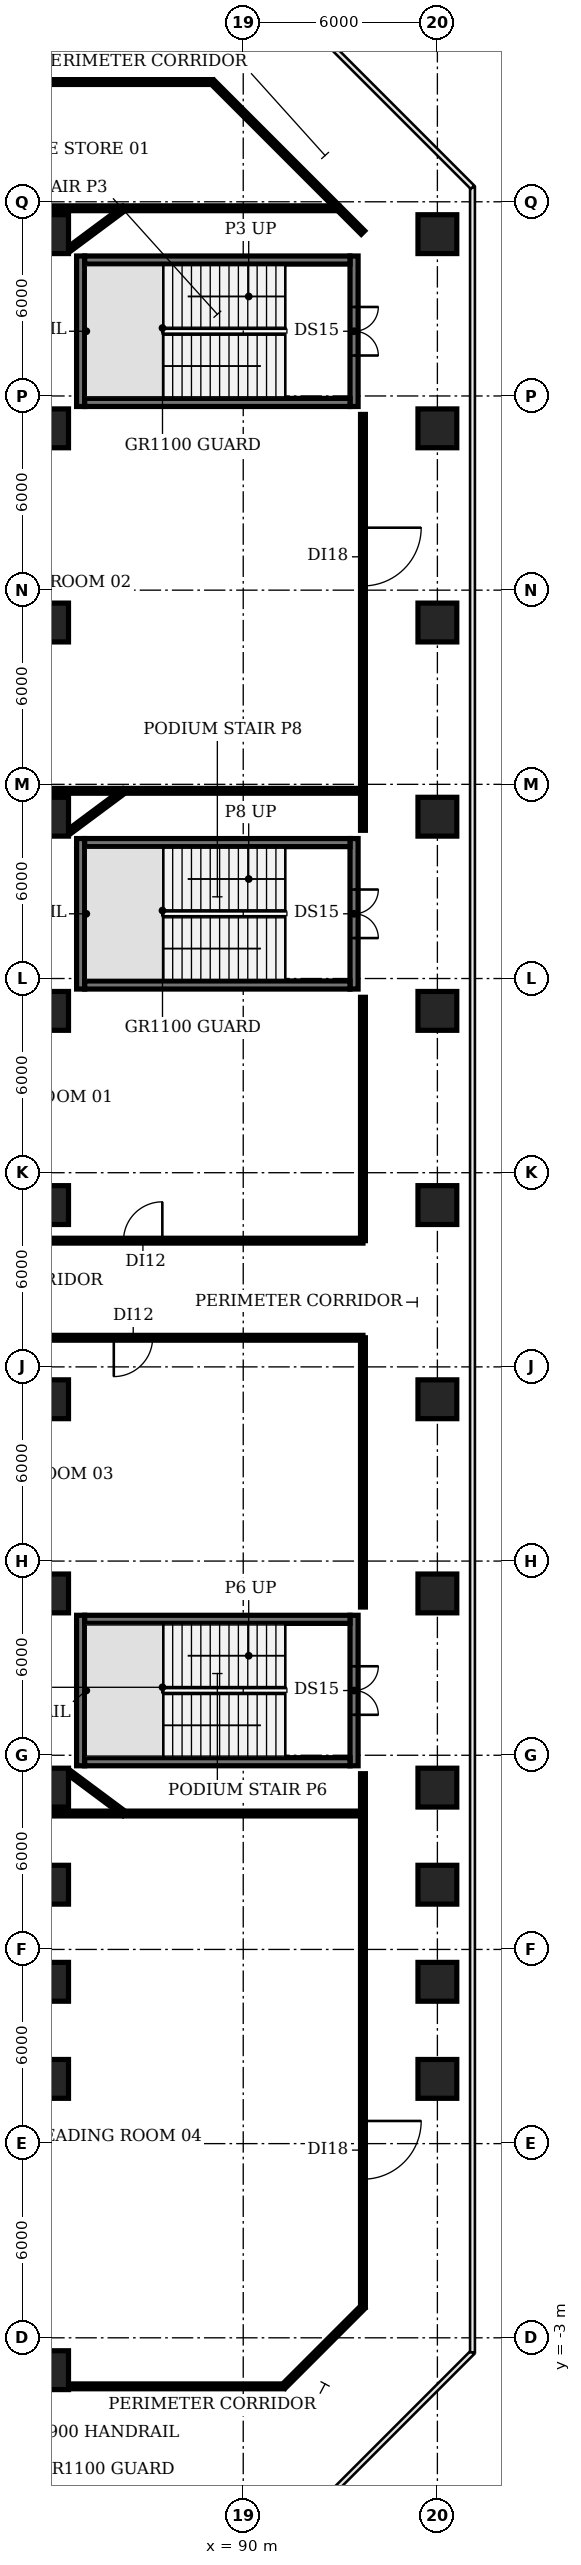
"""IFC4 building model, lengths in metres.
Left out: names, types, materials, properties, quantities, classifications, styles, units other than length and angle.
Written with IfcOpenShell. Run it as: python <this file> out.ifc"""

import sys

from ifc_helpers import new_model, si_unit, direction, frame, frame_2d, origin, origin_2d, place, context, subcontext, project, spatial, rectangle, extrude, element, fill, save


model = new_model("IFC4")
c1 = context("Model", 3, precision=1e-05, world=origin(), true_north=direction((0.0, 1.0)))
c2 = subcontext(c1, "Body", "Model", "MODEL_VIEW")
j1 = project(units=[si_unit("LENGTHUNIT", "METRE"), si_unit("PLANEANGLEUNIT", "RADIAN")], contexts=[c1])
p1 = place(None, origin())
s1 = spatial("IfcSite", under=j1, at=p1, CompositionType="ELEMENT")
p2 = place(p1, origin())
s2 = spatial("IfcBuilding", under=s1, at=p2, CompositionType="ELEMENT")
p3 = place(p2, frame((0.0, 0.0, 6.0)))
s3 = spatial("IfcBuildingStorey", under=s2, at=p3, CompositionType="ELEMENT", Elevation=6.0)
for number, where, z_axis, x_axis in (
    (1, (84.0, -4.0, 0.0), (0.0, 0.0, 1.0), (1.0, 0.0, 0.0)),
    (2, (84.0, 5.0, 0.0), (0.0, 0.0, 1.0), (1.0, 0.0, 0.0)),
    (3, (84.0, 8.0, 0.0), (0.0, 0.0, 1.0), (1.0, 0.0, 0.0)),
    (4, (84.0, 11.0, 0.0), (0.0, 0.0, 1.0), (1.0, 0.0, 0.0)),
    (5, (84.0, 14.0, 0.0), (0.0, 0.0, 1.0), (1.0, 0.0, 0.0)),
    (6, (84.0, 20.0, 0.0), (0.0, 0.0, 1.0), (1.0, 0.0, 0.0)),
    (7, (84.0, 26.0, 0.0), (0.0, 0.0, 1.0), (1.0, 0.0, 0.0)),
    (8, (84.0, 32.0, 0.0), (0.0, 0.0, 1.0), (1.0, 0.0, 0.0)),
    (9, (84.0, 38.0, 0.0), (0.0, 0.0, 1.0), (1.0, 0.0, 0.0)),
    (10, (84.0, 44.0, 0.0), (0.0, 0.0, 1.0), (1.0, 0.0, 0.0)),
    (11, (84.0, 50.0, 0.0), (0.0, 0.0, 1.0), (1.0, 0.0, 0.0)),
    (12, (84.0, 56.0, 0.0), (0.0, 0.0, 1.0), (1.0, 0.0, 0.0)),
    (13, (84.0, 62.0, 0.0), (0.0, 0.0, 1.0), (1.0, 0.0, 0.0)),
    (14, (96.0, 5.0, 0.0), (0.0, 0.0, 1.0), (1.0, 0.0, 0.0)),
    (15, (96.0, 8.0, 0.0), (0.0, 0.0, 1.0), (1.0, 0.0, 0.0)),
    (16, (96.0, 11.0, 0.0), (0.0, 0.0, 1.0), (1.0, 0.0, 0.0)),
    (17, (96.0, 14.0, 0.0), (0.0, 0.0, 1.0), (1.0, 0.0, 0.0)),
    (18, (96.0, 20.0, 0.0), (0.0, 0.0, 1.0), (1.0, 0.0, 0.0)),
    (19, (96.0, 26.0, 0.0), (0.0, 0.0, 1.0), (1.0, 0.0, 0.0)),
    (20, (96.0, 32.0, 0.0), (0.0, 0.0, 1.0), (1.0, 0.0, 0.0)),
    (21, (96.0, 38.0, 0.0), (0.0, 0.0, 1.0), (1.0, 0.0, 0.0)),
    (22, (96.0, 44.0, 0.0), (0.0, 0.0, 1.0), (1.0, 0.0, 0.0)),
    (23, (96.0, 50.0, 0.0), (0.0, 0.0, 1.0), (1.0, 0.0, 0.0)),
    (24, (96.0, 56.0, 0.0), (0.0, 0.0, 1.0), (1.0, 0.0, 0.0)),
    (25, (96.0, 62.0, 0.0), (0.0, 0.0, 1.0), (1.0, 0.0, 0.0)),
):
    element("IfcColumn", number, at=place(p3, frame(where, z_axis=z_axis, x_axis=x_axis)), inside=s3, PredefinedType="COLUMN", context=c2, shape_type="SweptSolid", body=[
        extrude(rectangle(XDim=1.2, YDim=1.2, at=origin_2d()), origin(), (0.0, 0.0, 1.0), 4.6),
    ])
p4 = place(p3, frame((84.975, 56.675, 0.0), z_axis=(0.0, 0.0, 1.0), x_axis=(0.0, 1.0, 0.0)))
e26 = element("IfcWall", 26, at=p4, inside=s3, PredefinedType="SHEAR", context=c2, shape_type="SweptSolid", body=[
    extrude(rectangle(XDim=4.65, YDim=0.25, at=frame_2d((2.325, 0.0))), origin(), (0.0, 0.0, 1.0), 4.6),
])
p5 = place(p3, frame((93.425, 61.325, 0.0), z_axis=(0.0, 0.0, 1.0), x_axis=(0.0, -1.0, 0.0)))
e27 = element("IfcWall", 27, at=p5, inside=s3, PredefinedType="SHEAR", context=c2, shape_type="SweptSolid", body=[
    extrude(rectangle(XDim=4.65, YDim=0.25, at=frame_2d((2.325, 0.0))), origin(), (0.0, 0.0, 1.0), 4.6),
])
p6 = place(p5, frame((1.575, 0.0, 0.0)))
e28 = element("IfcOpeningElement", 28, at=p6, cuts=e27, PredefinedType="OPENING", context=c2, shape_type="SweptSolid", body=[
    extrude(rectangle(XDim=1.5, YDim=2.1, at=frame_2d((0.75, 1.05))), frame((0.0, 0.135, 0.0), z_axis=(0.0, -1.0, 0.0), x_axis=(1.0, 0.0, 0.0)), (0.0, 0.0, 1.0), 0.27),
])
for number, where, z_axis, x_axis in (
    (29, (85.1, 56.8, 0.0), (0.0, 0.0, 1.0), (1.0, 0.0, 0.0)),
    (30, (85.1, 61.2, 0.0), (0.0, 0.0, 1.0), (1.0, 0.0, 0.0)),
):
    element("IfcWall", number, at=place(p3, frame(where, z_axis=z_axis, x_axis=x_axis)), inside=s3, PredefinedType="SHEAR", context=c2, shape_type="SweptSolid", body=[
        extrude(rectangle(XDim=8.2, YDim=0.25, at=frame_2d((4.1, 0.0))), origin(), (0.0, 0.0, 1.0), 4.6),
    ])
p7 = place(p3, frame((84.975, 14.675, 0.0), z_axis=(0.0, 0.0, 1.0), x_axis=(0.0, 1.0, 0.0)))
e31 = element("IfcWall", 31, at=p7, inside=s3, PredefinedType="SHEAR", context=c2, shape_type="SweptSolid", body=[
    extrude(rectangle(XDim=4.65, YDim=0.25, at=frame_2d((2.325, 0.0))), origin(), (0.0, 0.0, 1.0), 4.6),
])
p8 = place(p3, frame((93.425, 19.325, 0.0), z_axis=(0.0, 0.0, 1.0), x_axis=(0.0, -1.0, 0.0)))
e32 = element("IfcWall", 32, at=p8, inside=s3, PredefinedType="SHEAR", context=c2, shape_type="SweptSolid", body=[
    extrude(rectangle(XDim=4.65, YDim=0.25, at=frame_2d((2.325, 0.0))), origin(), (0.0, 0.0, 1.0), 4.6),
])
p9 = place(p8, frame((1.575, 0.0, 0.0)))
e33 = element("IfcOpeningElement", 33, at=p9, cuts=e32, PredefinedType="OPENING", context=c2, shape_type="SweptSolid", body=[
    extrude(rectangle(XDim=1.5, YDim=2.1, at=frame_2d((0.75, 1.05))), frame((0.0, 0.135, 0.0), z_axis=(0.0, -1.0, 0.0), x_axis=(1.0, 0.0, 0.0)), (0.0, 0.0, 1.0), 0.27),
])
for number, where, z_axis, x_axis in (
    (34, (85.1, 14.8, 0.0), (0.0, 0.0, 1.0), (1.0, 0.0, 0.0)),
    (35, (85.1, 19.2, 0.0), (0.0, 0.0, 1.0), (1.0, 0.0, 0.0)),
):
    element("IfcWall", number, at=place(p3, frame(where, z_axis=z_axis, x_axis=x_axis)), inside=s3, PredefinedType="SHEAR", context=c2, shape_type="SweptSolid", body=[
        extrude(rectangle(XDim=8.2, YDim=0.25, at=frame_2d((4.1, 0.0))), origin(), (0.0, 0.0, 1.0), 4.6),
    ])
p10 = place(p3, frame((84.975, 38.675, 0.0), z_axis=(0.0, 0.0, 1.0), x_axis=(0.0, 1.0, 0.0)))
e36 = element("IfcWall", 36, at=p10, inside=s3, PredefinedType="SHEAR", context=c2, shape_type="SweptSolid", body=[
    extrude(rectangle(XDim=4.65, YDim=0.25, at=frame_2d((2.325, 0.0))), origin(), (0.0, 0.0, 1.0), 4.6),
])
p11 = place(p3, frame((93.425, 43.325, 0.0), z_axis=(0.0, 0.0, 1.0), x_axis=(0.0, -1.0, 0.0)))
e37 = element("IfcWall", 37, at=p11, inside=s3, PredefinedType="SHEAR", context=c2, shape_type="SweptSolid", body=[
    extrude(rectangle(XDim=4.65, YDim=0.25, at=frame_2d((2.325, 0.0))), origin(), (0.0, 0.0, 1.0), 4.6),
])
p12 = place(p11, frame((1.575, 0.0, 0.0)))
e38 = element("IfcOpeningElement", 38, at=p12, cuts=e37, PredefinedType="OPENING", context=c2, shape_type="SweptSolid", body=[
    extrude(rectangle(XDim=1.5, YDim=2.1, at=frame_2d((0.75, 1.05))), frame((0.0, 0.135, 0.0), z_axis=(0.0, -1.0, 0.0), x_axis=(1.0, 0.0, 0.0)), (0.0, 0.0, 1.0), 0.27),
])
for number, where, z_axis, x_axis in (
    (39, (85.1, 38.8, 0.0), (0.0, 0.0, 1.0), (1.0, 0.0, 0.0)),
    (40, (85.1, 43.2, 0.0), (0.0, 0.0, 1.0), (1.0, 0.0, 0.0)),
):
    element("IfcWall", number, at=place(p3, frame(where, z_axis=z_axis, x_axis=x_axis)), inside=s3, PredefinedType="SHEAR", context=c2, shape_type="SweptSolid", body=[
        extrude(rectangle(XDim=8.2, YDim=0.25, at=frame_2d((4.1, 0.0))), origin(), (0.0, 0.0, 1.0), 4.6),
    ])
p13 = place(p3, frame((78.0, 13.2, 0.0), z_axis=(0.0, 0.0, 1.0), x_axis=(1.0, 0.0, 0.0)))
e41 = element("IfcWall", 41, at=p13, inside=s3, PredefinedType="PARTITIONING", context=c2, shape_type="SweptSolid", body=[
    extrude(rectangle(XDim=15.7, YDim=0.15, at=frame_2d((7.85, 0.0))), origin(), (0.0, 0.0, 1.0), 3.18),
])
p14 = place(p3, frame((78.0, 30.9, 0.0), z_axis=(0.0, 0.0, 1.0), x_axis=(1.0, 0.0, 0.0)))
e42 = element("IfcWall", 42, at=p14, inside=s3, PredefinedType="PARTITIONING", context=c2, shape_type="SweptSolid", body=[
    extrude(rectangle(XDim=15.7, YDim=0.15, at=frame_2d((7.85, 0.0))), origin(), (0.0, 0.0, 1.0), 3.18),
])
p15 = place(p14, frame((8.3, 0.0, 0.0)))
e43 = element("IfcOpeningElement", 43, at=p15, cuts=e42, PredefinedType="OPENING", context=c2, shape_type="SweptSolid", body=[
    extrude(rectangle(XDim=1.2, YDim=2.1, at=frame_2d((0.6, 1.05))), frame((0.0, 0.085, 0.0), z_axis=(0.0, -1.0, 0.0), x_axis=(1.0, 0.0, 0.0)), (0.0, 0.0, 1.0), 0.17),
])
p16 = place(p3, frame((78.0, 44.8, 0.0), z_axis=(0.0, 0.0, 1.0), x_axis=(1.0, 0.0, 0.0)))
e44 = element("IfcWall", 44, at=p16, inside=s3, PredefinedType="PARTITIONING", context=c2, shape_type="SweptSolid", body=[
    extrude(rectangle(XDim=15.7, YDim=0.15, at=frame_2d((7.85, 0.0))), origin(), (0.0, 0.0, 1.0), 3.18),
])
p17 = place(p3, frame((78.0, 62.8, 0.0), z_axis=(0.0, 0.0, 1.0), x_axis=(1.0, 0.0, 0.0)))
e45 = element("IfcWall", 45, at=p17, inside=s3, PredefinedType="PARTITIONING", context=c2, shape_type="SweptSolid", body=[
    extrude(rectangle(XDim=14.95, YDim=0.15, at=frame_2d((7.475, 0.0))), origin(), (0.0, 0.0, 1.0), 3.18),
])
p18 = place(p3, frame((84.46, -4.5, 0.0), z_axis=(0.0, 0.0, 1.0), x_axis=(1.0, 0.0, 0.0)))
e46 = element("IfcWall", 46, at=p18, inside=s3, PredefinedType="PARTITIONING", context=c2, shape_type="SweptSolid", body=[
    extrude(rectangle(XDim=6.79, YDim=0.15, at=frame_2d((3.395, 0.0))), origin(), (0.0, 0.0, 1.0), 3.18),
])
for number, where, z_axis, x_axis in (
    (47, (84.64, 14.45, 0.0), (0.0, 0.0, 1.0), (0.802, -0.597, 0.0)),
    (48, (84.64, 43.55, 0.0), (0.0, 0.0, 1.0), (0.802, 0.597, 0.0)),
    (49, (84.64, 61.55, 0.0), (0.0, 0.0, 1.0), (0.802, 0.597, 0.0)),
):
    element("IfcWall", number, at=place(p3, frame(where, z_axis=z_axis, x_axis=x_axis)), inside=s3, PredefinedType="PARTITIONING", context=c2, shape_type="SweptSolid", body=[
        extrude(rectangle(XDim=2.094, YDim=0.15, at=frame_2d((1.047, 0.0))), origin(), (0.0, 0.0, 1.0), 3.18),
    ])
p19 = place(p3, frame((89.05, 66.7, 0.0), z_axis=(0.0, 0.0, 1.0), x_axis=(-1.0, 0.0, 0.0)))
e50 = element("IfcWall", 50, at=p19, inside=s3, PredefinedType="PARTITIONING", context=c2, shape_type="SweptSolid", body=[
    extrude(rectangle(XDim=11.05, YDim=0.15, at=frame_2d((5.525, 0.0))), origin(), (0.0, 0.0, 1.0), 3.18),
])
p20 = place(p19, frame((6.65, 0.0, 0.0)))
e51 = element("IfcOpeningElement", 51, at=p20, cuts=e50, PredefinedType="OPENING", context=c2, shape_type="SweptSolid", body=[
    extrude(rectangle(XDim=0.9, YDim=2.1, at=frame_2d((0.45, 1.05))), frame((0.0, 0.085, 0.0), z_axis=(0.0, -1.0, 0.0), x_axis=(1.0, 0.0, 0.0)), (0.0, 0.0, 1.0), 0.17),
])
p21 = place(p3, frame((89.05, 66.7, 0.0), z_axis=(0.0, 0.0, 1.0), x_axis=(0.707106781187, -0.707106781187, 0.0)))
e52 = element("IfcWall", 52, at=p21, inside=s3, PredefinedType="PARTITIONING", context=c2, shape_type="SweptSolid", body=[
    extrude(rectangle(XDim=6.576, YDim=0.15, at=frame_2d((3.288, 0.0))), origin(), (0.0, 0.0, 1.0), 3.18),
])
p22 = place(p3, frame((91.25, -4.5, 0.0), z_axis=(0.0, 0.0, 1.0), x_axis=(0.707106781187, 0.707106781187, 0.0)))
e53 = element("IfcWall", 53, at=p22, inside=s3, PredefinedType="PARTITIONING", context=c2, shape_type="SweptSolid", body=[
    extrude(rectangle(XDim=3.465, YDim=0.15, at=frame_2d((1.732, 0.0))), origin(), (0.0, 0.0, 1.0), 3.18),
])
p23 = place(p3, frame((93.7, 13.2, 0.0), z_axis=(0.0, 0.0, 1.0), x_axis=(0.0, -1.0, 0.0)))
e54 = element("IfcWall", 54, at=p23, inside=s3, PredefinedType="PARTITIONING", context=c2, shape_type="SweptSolid", body=[
    extrude(rectangle(XDim=15.25, YDim=0.15, at=frame_2d((7.625, 0.0))), origin(), (0.0, 0.0, 1.0), 3.18),
])
p24 = place(p23, frame((9.5, 0.0, 0.0)))
e55 = element("IfcOpeningElement", 55, at=p24, cuts=e54, PredefinedType="OPENING", context=c2, shape_type="SweptSolid", body=[
    extrude(rectangle(XDim=1.8, YDim=2.1, at=frame_2d((0.9, 1.05))), frame((0.0, 0.085, 0.0), z_axis=(0.0, -1.0, 0.0), x_axis=(1.0, 0.0, 0.0)), (0.0, 0.0, 1.0), 0.17),
])
p25 = place(p3, frame((93.7, 13.2, 0.0), z_axis=(0.0, 0.0, 1.0), x_axis=(0.0, 1.0, 0.0)))
e56 = element("IfcWall", 56, at=p25, inside=s3, PredefinedType="PARTITIONING", context=c2, shape_type="SweptSolid", body=[
    extrude(rectangle(XDim=1.23, YDim=0.15, at=frame_2d((0.615, 0.0))), origin(), (0.0, 0.0, 1.0), 3.18),
])
p26 = place(p3, frame((93.7, 19.58, 0.0), z_axis=(0.0, 0.0, 1.0), x_axis=(0.0, 1.0, 0.0)))
e57 = element("IfcWall", 57, at=p26, inside=s3, PredefinedType="PARTITIONING", context=c2, shape_type="SweptSolid", body=[
    extrude(rectangle(XDim=8.32, YDim=0.15, at=frame_2d((4.16, 0.0))), origin(), (0.0, 0.0, 1.0), 3.18),
])
p27 = place(p3, frame((93.7, 27.9, 0.0), z_axis=(0.0, 0.0, 1.0), x_axis=(-1.0, 0.0, 0.0)))
e58 = element("IfcWall", 58, at=p27, inside=s3, PredefinedType="PARTITIONING", context=c2, shape_type="SweptSolid", body=[
    extrude(rectangle(XDim=15.7, YDim=0.15, at=frame_2d((7.85, 0.0))), origin(), (0.0, 0.0, 1.0), 3.18),
])
p28 = place(p27, frame((6.5, 0.0, 0.0)))
e59 = element("IfcOpeningElement", 59, at=p28, cuts=e58, PredefinedType="OPENING", context=c2, shape_type="SweptSolid", body=[
    extrude(rectangle(XDim=1.2, YDim=2.1, at=frame_2d((0.6, 1.05))), frame((0.0, 0.085, 0.0), z_axis=(0.0, -1.0, 0.0), x_axis=(1.0, 0.0, 0.0)), (0.0, 0.0, 1.0), 0.17),
])
p29 = place(p3, frame((93.7, 30.9, 0.0), z_axis=(0.0, 0.0, 1.0), x_axis=(0.0, 1.0, 0.0)))
e60 = element("IfcWall", 60, at=p29, inside=s3, PredefinedType="PARTITIONING", context=c2, shape_type="SweptSolid", body=[
    extrude(rectangle(XDim=7.52, YDim=0.15, at=frame_2d((3.76, 0.0))), origin(), (0.0, 0.0, 1.0), 3.18),
])
p30 = place(p3, frame((93.7, 43.58, 0.0), z_axis=(0.0, 0.0, 1.0), x_axis=(0.0, 1.0, 0.0)))
e61 = element("IfcWall", 61, at=p30, inside=s3, PredefinedType="PARTITIONING", context=c2, shape_type="SweptSolid", body=[
    extrude(rectangle(XDim=1.22, YDim=0.15, at=frame_2d((0.61, 0.0))), origin(), (0.0, 0.0, 1.0), 3.18),
])
p31 = place(p3, frame((93.7, 56.43, 0.0), z_axis=(0.0, 0.0, 1.0), x_axis=(0.0, -1.0, 0.0)))
e62 = element("IfcWall", 62, at=p31, inside=s3, PredefinedType="PARTITIONING", context=c2, shape_type="SweptSolid", body=[
    extrude(rectangle(XDim=11.63, YDim=0.15, at=frame_2d((5.815, 0.0))), origin(), (0.0, 0.0, 1.0), 3.18),
])
p32 = place(p31, frame((3.5, 0.0, 0.0)))
e63 = element("IfcOpeningElement", 63, at=p32, cuts=e62, PredefinedType="OPENING", context=c2, shape_type="SweptSolid", body=[
    extrude(rectangle(XDim=1.8, YDim=2.1, at=frame_2d((0.9, 1.05))), frame((0.0, 0.085, 0.0), z_axis=(0.0, -1.0, 0.0), x_axis=(1.0, 0.0, 0.0)), (0.0, 0.0, 1.0), 0.17),
])
p33 = place(p6, origin())
e64 = element("IfcDoor", 64, at=p33, inside=s3, OperationType="DOUBLE_DOOR_SINGLE_SWING", PredefinedType="DOOR", context=c2, shape_type="SweptSolid", body=[
    extrude(rectangle(XDim=1.5, YDim=2.1, at=frame_2d((0.75, 1.05))), frame((0.0, 0.025, 0.0), z_axis=(0.0, -1.0, 0.0), x_axis=(1.0, 0.0, 0.0)), (0.0, 0.0, 1.0), 0.05),
])
fill(e28, e64)
p34 = place(p9, origin())
e65 = element("IfcDoor", 65, at=p34, inside=s3, OperationType="DOUBLE_DOOR_SINGLE_SWING", PredefinedType="DOOR", context=c2, shape_type="SweptSolid", body=[
    extrude(rectangle(XDim=1.5, YDim=2.1, at=frame_2d((0.75, 1.05))), frame((0.0, 0.025, 0.0), z_axis=(0.0, -1.0, 0.0), x_axis=(1.0, 0.0, 0.0)), (0.0, 0.0, 1.0), 0.05),
])
fill(e33, e65)
p35 = place(p12, origin())
e66 = element("IfcDoor", 66, at=p35, inside=s3, OperationType="DOUBLE_DOOR_SINGLE_SWING", PredefinedType="DOOR", context=c2, shape_type="SweptSolid", body=[
    extrude(rectangle(XDim=1.5, YDim=2.1, at=frame_2d((0.75, 1.05))), frame((0.0, 0.025, 0.0), z_axis=(0.0, -1.0, 0.0), x_axis=(1.0, 0.0, 0.0)), (0.0, 0.0, 1.0), 0.05),
])
fill(e38, e66)
p36 = place(p15, origin())
e67 = element("IfcDoor", 67, at=p36, inside=s3, OperationType="SINGLE_SWING_RIGHT", PredefinedType="DOOR", context=c2, shape_type="SweptSolid", body=[
    extrude(rectangle(XDim=1.2, YDim=2.1, at=frame_2d((0.6, 1.05))), frame((0.0, 0.025, 0.0), z_axis=(0.0, -1.0, 0.0), x_axis=(1.0, 0.0, 0.0)), (0.0, 0.0, 1.0), 0.05),
])
fill(e43, e67)
p37 = place(p24, origin())
e68 = element("IfcDoor", 68, at=p37, inside=s3, OperationType="SINGLE_SWING_LEFT", PredefinedType="DOOR", context=c2, shape_type="SweptSolid", body=[
    extrude(rectangle(XDim=1.8, YDim=2.1, at=frame_2d((0.9, 1.05))), frame((0.0, 0.025, 0.0), z_axis=(0.0, -1.0, 0.0), x_axis=(1.0, 0.0, 0.0)), (0.0, 0.0, 1.0), 0.05),
])
fill(e55, e68)
p38 = place(p28, origin())
e69 = element("IfcDoor", 69, at=p38, inside=s3, OperationType="SINGLE_SWING_RIGHT", PredefinedType="DOOR", context=c2, shape_type="SweptSolid", body=[
    extrude(rectangle(XDim=1.2, YDim=2.1, at=frame_2d((0.6, 1.05))), frame((0.0, 0.025, 0.0), z_axis=(0.0, -1.0, 0.0), x_axis=(1.0, 0.0, 0.0)), (0.0, 0.0, 1.0), 0.05),
])
fill(e59, e69)
p39 = place(p32, origin())
e70 = element("IfcDoor", 70, at=p39, inside=s3, OperationType="SINGLE_SWING_LEFT", PredefinedType="DOOR", context=c2, shape_type="SweptSolid", body=[
    extrude(rectangle(XDim=1.8, YDim=2.1, at=frame_2d((0.9, 1.05))), frame((0.0, 0.025, 0.0), z_axis=(0.0, -1.0, 0.0), x_axis=(1.0, 0.0, 0.0)), (0.0, 0.0, 1.0), 0.05),
])
fill(e63, e70)
save(model, sys.argv[1])
